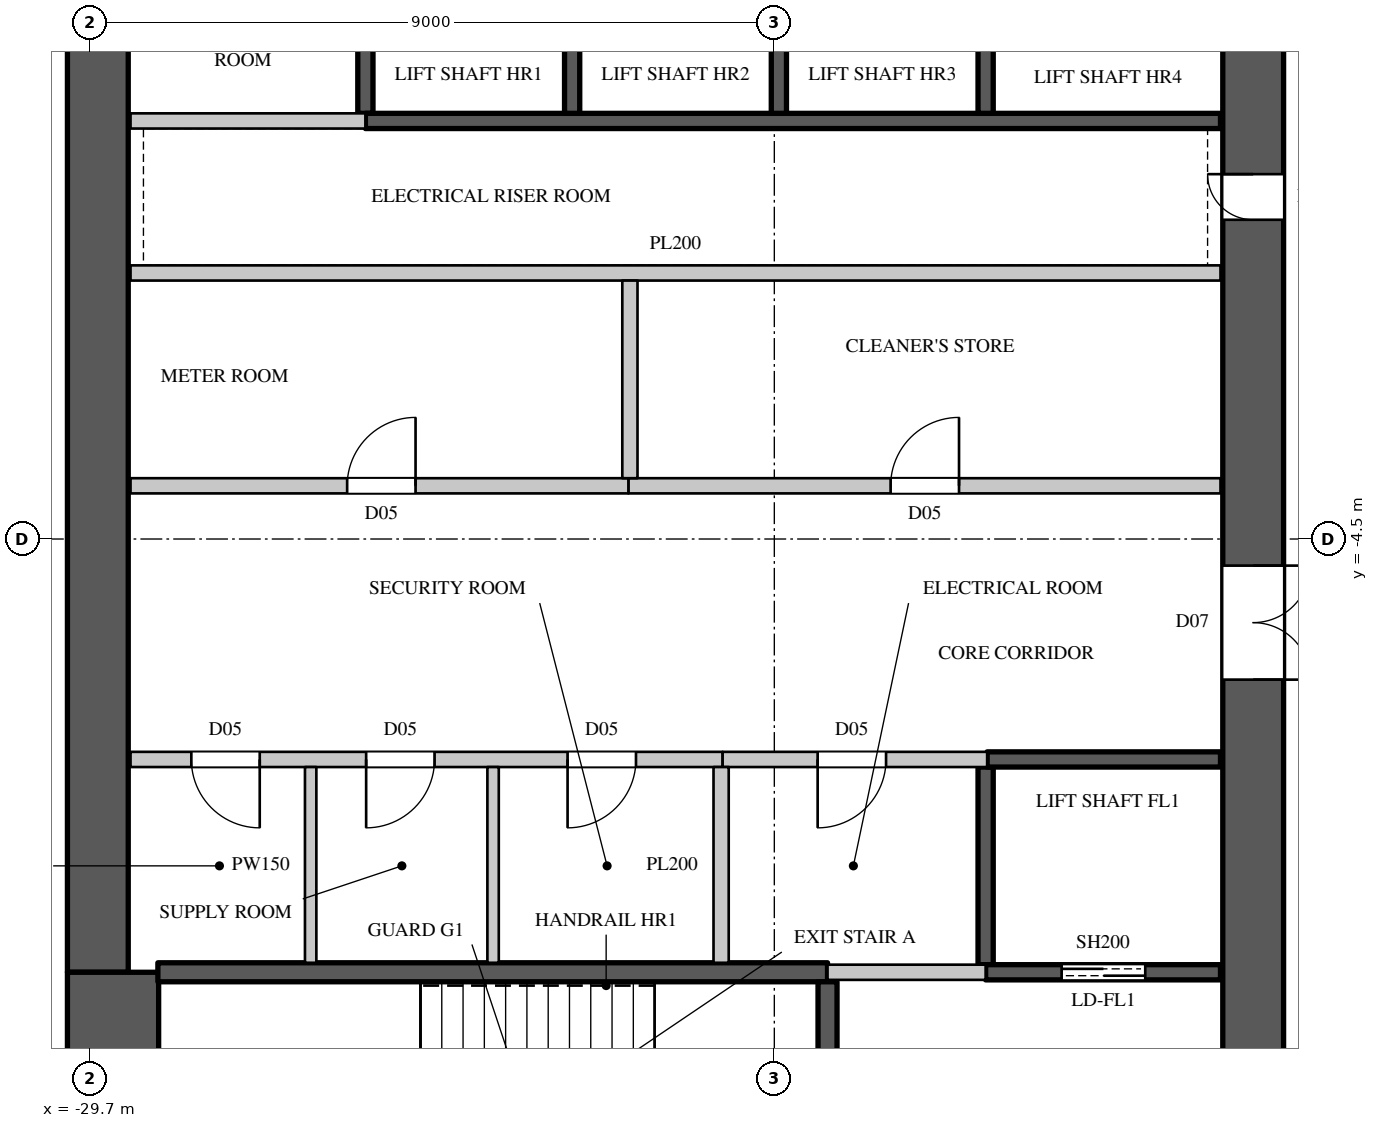
"""IFC4 building model, lengths in metres.
Left out: names, types, materials, properties, quantities, classifications, styles, units other than length and angle.
Written with IfcOpenShell. Run it as: python <this file> out.ifc"""

import sys

from ifc_helpers import new_model, si_unit, direction, frame, frame_2d, origin, place, context, subcontext, project, spatial, rectangle, extrude, element, fill, save


model = new_model("IFC4")
c1 = context("Model", 3, precision=1e-05, world=origin(), true_north=direction((0.0, 1.0)))
c2 = subcontext(c1, "Body", "Model", "MODEL_VIEW")
j1 = project(units=[si_unit("LENGTHUNIT", "METRE"), si_unit("PLANEANGLEUNIT", "RADIAN")], contexts=[c1])
p1 = place(None, origin())
s1 = spatial("IfcSite", under=j1, at=p1, CompositionType="ELEMENT")
p2 = place(p1, origin())
s2 = spatial("IfcBuilding", under=s1, at=p2, CompositionType="ELEMENT")
p3 = place(p2, frame((0.0, 0.0, 160.5)))
s3 = spatial("IfcBuildingStorey", under=s2, at=p3, CompositionType="ELEMENT", Elevation=160.5)
p4 = place(p3, frame((-14.4, -14.8, 0.0), z_axis=(0.0, 0.0, 1.0), x_axis=(0.0, 1.0, 0.0)))
e1 = element("IfcWall", 1, at=p4, inside=s3, PredefinedType="SHEAR", context=c2, shape_type="SweptSolid", body=[
    extrude(rectangle(XDim=29.6, YDim=0.8, at=frame_2d((14.8, 0.0))), origin(), (0.0, 0.0, 1.0), 4.1),
])
p5 = place(p4, frame((1.55, 0.0, 0.0)))
e2 = element("IfcOpeningElement", 2, at=p5, cuts=e1, PredefinedType="OPENING", context=c2, shape_type="SweptSolid", body=[
    extrude(rectangle(XDim=1.5, YDim=2.4, at=frame_2d((0.75, 1.2))), frame((0.0, 0.41, 0.0), z_axis=(0.0, -1.0, 0.0), x_axis=(1.0, 0.0, 0.0)), (0.0, 0.0, 1.0), 0.82),
])
p6 = place(p4, frame((26.55, 0.0, 0.0)))
e3 = element("IfcOpeningElement", 3, at=p6, cuts=e1, PredefinedType="OPENING", context=c2, shape_type="SweptSolid", body=[
    extrude(rectangle(XDim=1.5, YDim=2.4, at=frame_2d((0.75, 1.2))), frame((0.0, 0.41, 0.0), z_axis=(0.0, -1.0, 0.0), x_axis=(1.0, 0.0, 0.0)), (0.0, 0.0, 1.0), 0.82),
])
p7 = place(p4, frame((8.45, 0.0, 0.0)))
e4 = element("IfcOpeningElement", 4, at=p7, cuts=e1, PredefinedType="OPENING", context=c2, shape_type="SweptSolid", body=[
    extrude(rectangle(XDim=1.5, YDim=2.4, at=frame_2d((0.75, 1.2))), frame((0.0, 0.41, 0.0), z_axis=(0.0, -1.0, 0.0), x_axis=(1.0, 0.0, 0.0)), (0.0, 0.0, 1.0), 0.82),
])
p8 = place(p4, frame((19.65, 0.0, 0.0)))
e5 = element("IfcOpeningElement", 5, at=p8, cuts=e1, PredefinedType="OPENING", context=c2, shape_type="SweptSolid", body=[
    extrude(rectangle(XDim=1.5, YDim=2.4, at=frame_2d((0.75, 1.2))), frame((0.0, 0.41, 0.0), z_axis=(0.0, -1.0, 0.0), x_axis=(1.0, 0.0, 0.0)), (0.0, 0.0, 1.0), 0.82),
])
p9 = place(p4, frame((14.5, 0.0, 0.0)))
e6 = element("IfcOpeningElement", 6, at=p9, cuts=e1, PredefinedType="OPENING", context=c2, shape_type="SweptSolid", body=[
    extrude(rectangle(XDim=0.6, YDim=2.0, at=frame_2d((0.3, 1.0))), frame((0.0, 0.41, 0.0), z_axis=(0.0, -1.0, 0.0), x_axis=(1.0, 0.0, 0.0)), (0.0, 0.0, 1.0), 0.82),
])
p10 = place(p3, frame((-29.6, -10.2, 0.0), z_axis=(0.0, 0.0, 1.0), x_axis=(0.0, 1.0, 0.0)))
e7 = element("IfcWall", 7, at=p10, inside=s3, PredefinedType="SHEAR", context=c2, shape_type="SweptSolid", body=[
    extrude(rectangle(XDim=20.4, YDim=0.8, at=frame_2d((10.2, 0.0))), origin(), (0.0, 0.0, 1.0), 4.1),
])
p11 = place(p3, frame((-29.4, -14.8, 0.0), z_axis=(0.0, 0.0, 1.0), x_axis=(0.0, 1.0, 0.0)))
e8 = element("IfcWall", 8, at=p11, inside=s3, PredefinedType="SHEAR", context=c2, shape_type="SweptSolid", body=[
    extrude(rectangle(XDim=4.6, YDim=1.2, at=frame_2d((2.3, 0.0))), origin(), (0.0, 0.0, 1.0), 4.1),
])
p12 = place(p3, frame((-29.17, -7.4, 0.0), z_axis=(0.0, 0.0, 1.0), x_axis=(1.0, 0.0, 0.0)))
e9 = element("IfcWall", 9, at=p12, inside=s3, PredefinedType="PARTITIONING", context=c2, shape_type="SweptSolid", body=[
    extrude(rectangle(XDim=7.79, YDim=0.2, at=frame_2d((3.895, 0.0))), origin(), (0.0, 0.0, 1.0), 3.8),
])
p13 = place(p12, frame((0.8, 0.0, 0.0)))
e10 = element("IfcOpeningElement", 10, at=p13, cuts=e9, PredefinedType="OPENING", context=c2, shape_type="SweptSolid", body=[
    extrude(rectangle(XDim=0.9, YDim=2.2, at=frame_2d((0.45, 1.1))), frame((0.0, 0.11, 0.0), z_axis=(0.0, -1.0, 0.0), x_axis=(1.0, 0.0, 0.0)), (0.0, 0.0, 1.0), 0.22),
])
p14 = place(p12, frame((3.1, 0.0, 0.0)))
e11 = element("IfcOpeningElement", 11, at=p14, cuts=e9, PredefinedType="OPENING", context=c2, shape_type="SweptSolid", body=[
    extrude(rectangle(XDim=0.9, YDim=2.2, at=frame_2d((0.45, 1.1))), frame((0.0, 0.11, 0.0), z_axis=(0.0, -1.0, 0.0), x_axis=(1.0, 0.0, 0.0)), (0.0, 0.0, 1.0), 0.22),
])
p15 = place(p12, frame((5.75, 0.0, 0.0)))
e12 = element("IfcOpeningElement", 12, at=p15, cuts=e9, PredefinedType="OPENING", context=c2, shape_type="SweptSolid", body=[
    extrude(rectangle(XDim=0.9, YDim=2.2, at=frame_2d((0.45, 1.1))), frame((0.0, 0.11, 0.0), z_axis=(0.0, -1.0, 0.0), x_axis=(1.0, 0.0, 0.0)), (0.0, 0.0, 1.0), 0.22),
])
p16 = place(p3, frame((-22.62, -3.8, 0.0), z_axis=(0.0, 0.0, 1.0), x_axis=(1.0, 0.0, 0.0)))
e13 = element("IfcWall", 13, at=p16, inside=s3, PredefinedType="PARTITIONING", context=c2, shape_type="SweptSolid", body=[
    extrude(rectangle(XDim=7.79, YDim=0.2, at=frame_2d((3.895, 0.0))), origin(), (0.0, 0.0, 1.0), 3.8),
])
p17 = place(p16, frame((3.45, 0.0, 0.0)))
e14 = element("IfcOpeningElement", 14, at=p17, cuts=e13, PredefinedType="OPENING", context=c2, shape_type="SweptSolid", body=[
    extrude(rectangle(XDim=0.9, YDim=2.2, at=frame_2d((0.45, 1.1))), frame((0.0, 0.11, 0.0), z_axis=(0.0, -1.0, 0.0), x_axis=(1.0, 0.0, 0.0)), (0.0, 0.0, 1.0), 0.22),
])
for number, where, z_axis, x_axis in (
    (15, (-26.8, -10.075, 0.0), (0.0, 0.0, 1.0), (0.0, 1.0, 0.0)),
    (16, (-24.4, -10.075, 0.0), (0.0, 0.0, 1.0), (0.0, 1.0, 0.0)),
):
    element("IfcWall", number, at=place(p3, frame(where, z_axis=z_axis, x_axis=x_axis)), inside=s3, PredefinedType="PARTITIONING", context=c2, shape_type="SweptSolid", body=[
        extrude(rectangle(XDim=2.575, YDim=0.15, at=frame_2d((1.288, 0.0))), origin(), (0.0, 0.0, 1.0), 3.8),
    ])
p18 = place(p3, frame((-29.17, -3.8, 0.0), z_axis=(0.0, 0.0, 1.0), x_axis=(1.0, 0.0, 0.0)))
e17 = element("IfcWall", 17, at=p18, inside=s3, PredefinedType="PARTITIONING", context=c2, shape_type="SweptSolid", body=[
    extrude(rectangle(XDim=6.55, YDim=0.2, at=frame_2d((3.275, 0.0))), origin(), (0.0, 0.0, 1.0), 3.8),
])
p19 = place(p18, frame((2.85, 0.0, 0.0)))
e18 = element("IfcOpeningElement", 18, at=p19, cuts=e17, PredefinedType="OPENING", context=c2, shape_type="SweptSolid", body=[
    extrude(rectangle(XDim=0.9, YDim=2.2, at=frame_2d((0.45, 1.1))), frame((0.0, 0.11, 0.0), z_axis=(0.0, -1.0, 0.0), x_axis=(1.0, 0.0, 0.0)), (0.0, 0.0, 1.0), 0.22),
])
p20 = place(p3, frame((-29.17, -1.0, 0.0), z_axis=(0.0, 0.0, 1.0), x_axis=(1.0, 0.0, 0.0)))
e19 = element("IfcWall", 19, at=p20, inside=s3, PredefinedType="PARTITIONING", context=c2, shape_type="SweptSolid", body=[
    extrude(rectangle(XDim=14.34, YDim=0.2, at=frame_2d((7.17, 0.0))), origin(), (0.0, 0.0, 1.0), 3.8),
])
p21 = place(p3, frame((-29.17, 1.0, 0.0), z_axis=(0.0, 0.0, 1.0), x_axis=(1.0, 0.0, 0.0)))
e20 = element("IfcWall", 20, at=p21, inside=s3, PredefinedType="PARTITIONING", context=c2, shape_type="SweptSolid", body=[
    extrude(rectangle(XDim=3.09, YDim=0.2, at=frame_2d((1.545, 0.0))), origin(), (0.0, 0.0, 1.0), 3.8),
])
p22 = place(p3, frame((-22.6, -3.7, 0.0), z_axis=(0.0, 0.0, 1.0), x_axis=(0.0, 1.0, 0.0)))
e21 = element("IfcWall", 21, at=p22, inside=s3, PredefinedType="PARTITIONING", context=c2, shape_type="SweptSolid", body=[
    extrude(rectangle(XDim=2.6, YDim=0.2, at=frame_2d((1.3, 0.0))), origin(), (0.0, 0.0, 1.0), 3.8),
])
p23 = place(p3, frame((-21.38, -7.4, 0.0), z_axis=(0.0, 0.0, 1.0), x_axis=(1.0, 0.0, 0.0)))
e22 = element("IfcWall", 22, at=p23, inside=s3, PredefinedType="PARTITIONING", context=c2, shape_type="SweptSolid", body=[
    extrude(rectangle(XDim=3.48, YDim=0.2, at=frame_2d((1.74, 0.0))), origin(), (0.0, 0.0, 1.0), 3.8),
])
p24 = place(p23, frame((1.25, 0.0, 0.0)))
e23 = element("IfcOpeningElement", 23, at=p24, cuts=e22, PredefinedType="OPENING", context=c2, shape_type="SweptSolid", body=[
    extrude(rectangle(XDim=0.9, YDim=2.2, at=frame_2d((0.45, 1.1))), frame((0.0, 0.11, 0.0), z_axis=(0.0, -1.0, 0.0), x_axis=(1.0, 0.0, 0.0)), (0.0, 0.0, 1.0), 0.22),
])
p25 = place(p3, frame((-21.4, -10.075, 0.0), z_axis=(0.0, 0.0, 1.0), x_axis=(0.0, 1.0, 0.0)))
e24 = element("IfcWall", 24, at=p25, inside=s3, PredefinedType="PARTITIONING", context=c2, shape_type="SweptSolid", body=[
    extrude(rectangle(XDim=2.575, YDim=0.2, at=frame_2d((1.288, 0.0))), origin(), (0.0, 0.0, 1.0), 3.8),
])
p26 = place(p3, frame((-20.0, -10.2, 0.0), z_axis=(0.0, 0.0, 1.0), x_axis=(1.0, 0.0, 0.0)))
e25 = element("IfcWall", 25, at=p26, inside=s3, PredefinedType="PARTITIONING", context=c2, shape_type="SweptSolid", body=[
    extrude(rectangle(XDim=2.08, YDim=0.2, at=frame_2d((1.04, 0.0))), origin(), (0.0, 0.0, 1.0), 3.8),
])
p27 = place(p3, frame((-26.08, 1.1, 0.0), z_axis=(0.0, 0.0, 1.0), x_axis=(0.0, 1.0, 0.0)))
e26 = element("IfcWall", 26, at=p27, inside=s3, PredefinedType="SHEAR", context=c2, shape_type="SweptSolid", body=[
    extrude(rectangle(XDim=2.6, YDim=0.2, at=frame_2d((1.3, 0.0))), origin(), (0.0, 0.0, 1.0), 3.8),
])
p28 = place(p3, frame((-26.08, 1.0, 0.0), z_axis=(0.0, 0.0, 1.0), x_axis=(1.0, 0.0, 0.0)))
e27 = element("IfcWall", 27, at=p28, inside=s3, PredefinedType="SHEAR", context=c2, shape_type="SweptSolid", body=[
    extrude(rectangle(XDim=11.25, YDim=0.2, at=frame_2d((5.625, 0.0))), origin(), (0.0, 0.0, 1.0), 3.8),
])
for number, where, z_axis, x_axis in (
    (28, (-23.36, 1.1, 0.0), (0.0, 0.0, 1.0), (0.0, 1.0, 0.0)),
    (29, (-20.64, 1.1, 0.0), (0.0, 0.0, 1.0), (0.0, 1.0, 0.0)),
):
    element("IfcWall", number, at=place(p3, frame(where, z_axis=z_axis, x_axis=x_axis)), inside=s3, PredefinedType="SHEAR", context=c2, shape_type="SweptSolid", body=[
        extrude(rectangle(XDim=2.6, YDim=0.2, at=frame_2d((1.3, 0.0))), origin(), (0.0, 0.0, 1.0), 4.1),
    ])
p29 = place(p3, frame((-17.92, -10.1, 0.0), z_axis=(0.0, 0.0, 1.0), x_axis=(0.0, 1.0, 0.0)))
e30 = element("IfcWall", 30, at=p29, inside=s3, PredefinedType="SHEAR", context=c2, shape_type="SweptSolid", body=[
    extrude(rectangle(XDim=2.6, YDim=0.2, at=frame_2d((1.3, 0.0))), origin(), (0.0, 0.0, 1.0), 3.8),
])
p30 = place(p3, frame((-17.92, -10.2, 0.0), z_axis=(0.0, 0.0, 1.0), x_axis=(1.0, 0.0, 0.0)))
e31 = element("IfcWall", 31, at=p30, inside=s3, PredefinedType="SHEAR", context=c2, shape_type="SweptSolid", body=[
    extrude(rectangle(XDim=3.09, YDim=0.2, at=frame_2d((1.545, 0.0))), origin(), (0.0, 0.0, 1.0), 3.8),
])
p31 = place(p30, frame((1.0, 0.0, 0.0)))
e32 = element("IfcOpeningElement", 32, at=p31, cuts=e31, PredefinedType="OPENING", context=c2, shape_type="SweptSolid", body=[
    extrude(rectangle(XDim=1.1, YDim=2.2, at=frame_2d((0.55, 1.1))), frame((0.0, 0.11, 0.0), z_axis=(0.0, -1.0, 0.0), x_axis=(1.0, 0.0, 0.0)), (0.0, 0.0, 1.0), 0.22),
])
p32 = place(p3, frame((-17.9, -7.4, 0.0), z_axis=(0.0, 0.0, 1.0), x_axis=(1.0, 0.0, 0.0)))
e33 = element("IfcWall", 33, at=p32, inside=s3, PredefinedType="SHEAR", context=c2, shape_type="SweptSolid", body=[
    extrude(rectangle(XDim=3.07, YDim=0.2, at=frame_2d((1.535, 0.0))), origin(), (0.0, 0.0, 1.0), 3.8),
])
p33 = place(p3, frame((-17.92, 1.1, 0.0), z_axis=(0.0, 0.0, 1.0), x_axis=(0.0, 1.0, 0.0)))
e34 = element("IfcWall", 34, at=p33, inside=s3, PredefinedType="SHEAR", context=c2, shape_type="SweptSolid", body=[
    extrude(rectangle(XDim=2.6, YDim=0.2, at=frame_2d((1.3, 0.0))), origin(), (0.0, 0.0, 1.0), 4.1),
])
p34 = place(p3, frame((-28.81, -10.2, 0.0), z_axis=(0.0, 0.0, 1.0), x_axis=(1.0, 0.0, 0.0)))
e35 = element("IfcWall", 35, at=p34, inside=s3, PredefinedType="SHEAR", context=c2, shape_type="SweptSolid", body=[
    extrude(rectangle(XDim=8.81, YDim=0.25, at=frame_2d((4.405, 0.0))), origin(), (0.0, 0.0, 1.0), 3.8),
])
p35 = place(p3, frame((-20.0, -14.77, 0.0), z_axis=(0.0, 0.0, 1.0), x_axis=(0.0, 1.0, 0.0)))
e36 = element("IfcWall", 36, at=p35, inside=s3, PredefinedType="SHEAR", context=c2, shape_type="SweptSolid", body=[
    extrude(rectangle(XDim=4.445, YDim=0.25, at=frame_2d((2.223, 0.0))), origin(), (0.0, 0.0, 1.0), 3.8),
])
p36 = place(p35, frame((1.7, 0.0, 0.0)))
e37 = element("IfcOpeningElement", 37, at=p36, cuts=e36, PredefinedType="OPENING", context=c2, shape_type="SweptSolid", body=[
    extrude(rectangle(XDim=1.1, YDim=2.2, at=frame_2d((0.55, 1.1))), frame((0.0, 0.135, 0.0), z_axis=(0.0, -1.0, 0.0), x_axis=(1.0, 0.0, 0.0)), (0.0, 0.0, 1.0), 0.27),
])
p37 = place(p13, origin())
e38 = element("IfcDoor", 38, at=p37, inside=s3, OperationType="SINGLE_SWING_LEFT", PredefinedType="DOOR", context=c2, shape_type="SweptSolid", body=[
    extrude(rectangle(XDim=0.9, YDim=2.2, at=frame_2d((0.45, 1.1))), frame((0.0, 0.025, 0.0), z_axis=(0.0, -1.0, 0.0), x_axis=(1.0, 0.0, 0.0)), (0.0, 0.0, 1.0), 0.05),
])
fill(e10, e38)
p38 = place(p14, origin())
e39 = element("IfcDoor", 39, at=p38, inside=s3, OperationType="SINGLE_SWING_RIGHT", PredefinedType="DOOR", context=c2, shape_type="SweptSolid", body=[
    extrude(rectangle(XDim=0.9, YDim=2.2, at=frame_2d((0.45, 1.1))), frame((0.0, 0.025, 0.0), z_axis=(0.0, -1.0, 0.0), x_axis=(1.0, 0.0, 0.0)), (0.0, 0.0, 1.0), 0.05),
])
fill(e11, e39)
p39 = place(p15, origin())
e40 = element("IfcDoor", 40, at=p39, inside=s3, OperationType="SINGLE_SWING_RIGHT", PredefinedType="DOOR", context=c2, shape_type="SweptSolid", body=[
    extrude(rectangle(XDim=0.9, YDim=2.2, at=frame_2d((0.45, 1.1))), frame((0.0, 0.025, 0.0), z_axis=(0.0, -1.0, 0.0), x_axis=(1.0, 0.0, 0.0)), (0.0, 0.0, 1.0), 0.05),
])
fill(e12, e40)
p40 = place(p24, origin())
e41 = element("IfcDoor", 41, at=p40, inside=s3, OperationType="SINGLE_SWING_RIGHT", PredefinedType="DOOR", context=c2, shape_type="SweptSolid", body=[
    extrude(rectangle(XDim=0.9, YDim=2.2, at=frame_2d((0.45, 1.1))), frame((0.0, 0.025, 0.0), z_axis=(0.0, -1.0, 0.0), x_axis=(1.0, 0.0, 0.0)), (0.0, 0.0, 1.0), 0.05),
])
fill(e23, e41)
p41 = place(p19, origin())
e42 = element("IfcDoor", 42, at=p41, inside=s3, OperationType="SINGLE_SWING_RIGHT", PredefinedType="DOOR", context=c2, shape_type="SweptSolid", body=[
    extrude(rectangle(XDim=0.9, YDim=2.2, at=frame_2d((0.45, 1.1))), frame((0.0, 0.025, 0.0), z_axis=(0.0, -1.0, 0.0), x_axis=(1.0, 0.0, 0.0)), (0.0, 0.0, 1.0), 0.05),
])
fill(e18, e42)
p42 = place(p17, origin())
e43 = element("IfcDoor", 43, at=p42, inside=s3, OperationType="SINGLE_SWING_RIGHT", PredefinedType="DOOR", context=c2, shape_type="SweptSolid", body=[
    extrude(rectangle(XDim=0.9, YDim=2.2, at=frame_2d((0.45, 1.1))), frame((0.0, 0.025, 0.0), z_axis=(0.0, -1.0, 0.0), x_axis=(1.0, 0.0, 0.0)), (0.0, 0.0, 1.0), 0.05),
])
fill(e14, e43)
p43 = place(p31, origin())
e44 = element("IfcDoor", 44, at=p43, inside=s3, OperationType="DOUBLE_DOOR_SLIDING", PredefinedType="DOOR", context=c2, shape_type="SweptSolid", body=[
    extrude(rectangle(XDim=1.1, YDim=2.2, at=frame_2d((0.55, 1.1))), frame((0.0, 0.025, 0.0), z_axis=(0.0, -1.0, 0.0), x_axis=(1.0, 0.0, 0.0)), (0.0, 0.0, 1.0), 0.05),
])
fill(e32, e44)
p44 = place(p7, origin())
e45 = element("IfcDoor", 45, at=p44, inside=s3, OperationType="DOUBLE_DOOR_SINGLE_SWING", PredefinedType="DOOR", context=c2, shape_type="SweptSolid", body=[
    extrude(rectangle(XDim=1.5, YDim=2.4, at=frame_2d((0.75, 1.2))), frame((0.0, -0.345, 0.0), z_axis=(0.0, -1.0, 0.0), x_axis=(1.0, 0.0, 0.0)), (0.0, 0.0, 1.0), 0.05),
])
fill(e4, e45)
p45 = place(p9, origin())
e46 = element("IfcDoor", 46, at=p45, inside=s3, OperationType="SINGLE_SWING_RIGHT", PredefinedType="DOOR", context=c2, shape_type="SweptSolid", body=[
    extrude(rectangle(XDim=0.6, YDim=2.0, at=frame_2d((0.3, 1.0))), frame((0.0, 0.395, 0.0), z_axis=(0.0, -1.0, 0.0), x_axis=(1.0, 0.0, 0.0)), (0.0, 0.0, 1.0), 0.05),
])
fill(e6, e46)
save(model, sys.argv[1])
